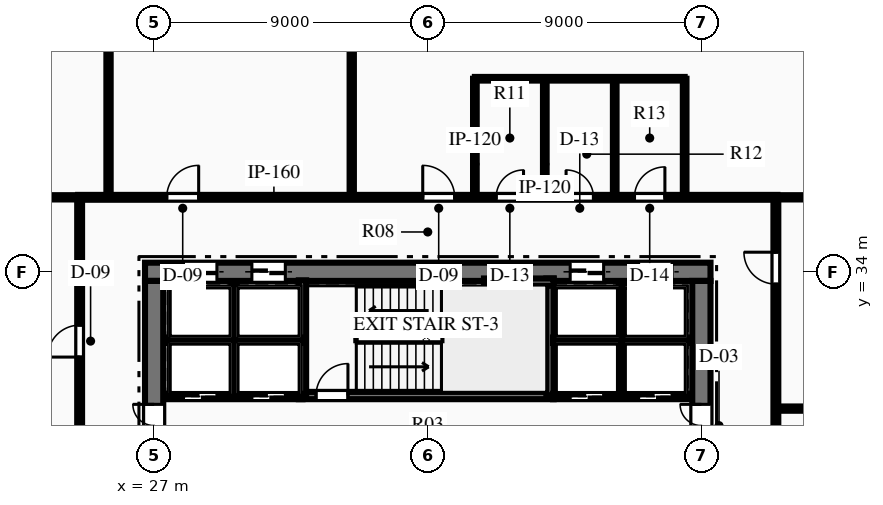
"""IFC4 building model, lengths in metres.
Left out: names, types, materials, properties, quantities, classifications, styles, units other than length and angle.
Written with IfcOpenShell. Run it as: python <this file> out.ifc"""

import sys

from ifc_helpers import new_model, si_unit, direction, frame, frame_2d, origin, place, context, subcontext, project, spatial, rectangle, extrude, element, fill, save


model = new_model("IFC4")
c1 = context("Model", 3, precision=1e-05, world=origin(), true_north=direction((0.0, 1.0)))
c2 = subcontext(c1, "Body", "Model", "MODEL_VIEW")
j1 = project(units=[si_unit("LENGTHUNIT", "METRE"), si_unit("PLANEANGLEUNIT", "RADIAN")], contexts=[c1])
p1 = place(None, origin())
s1 = spatial("IfcSite", under=j1, at=p1, CompositionType="ELEMENT")
p2 = place(p1, origin())
s2 = spatial("IfcBuilding", under=s1, at=p2, CompositionType="ELEMENT")
p3 = place(p2, frame((0.0, 0.0, 32.7)))
s3 = spatial("IfcBuildingStorey", under=s2, at=p3, CompositionType="ELEMENT", Elevation=32.7)
p4 = place(p3, frame((26.7, 34.0, 0.0), z_axis=(0.0, 0.0, 1.0), x_axis=(1.0, 0.0, 0.0)))
e1 = element("IfcWall", 1, at=p4, inside=s3, PredefinedType="SHEAR", context=c2, shape_type="SweptSolid", body=[
    extrude(rectangle(XDim=18.6, YDim=0.6, at=frame_2d((9.3, 0.0))), origin(), (0.0, 0.0, 1.0), 3.75),
])
p5 = place(p4, frame((1.265, 0.0, 0.0)))
e2 = element("IfcOpeningElement", 2, at=p5, cuts=e1, PredefinedType="OPENING", context=c2, shape_type="SweptSolid", body=[
    extrude(rectangle(XDim=1.1, YDim=2.15, at=frame_2d((0.55, 1.075))), frame((0.0, 0.31, 0.0), z_axis=(0.0, -1.0, 0.0), x_axis=(1.0, 0.0, 0.0)), (0.0, 0.0, 1.0), 0.62),
])
p6 = place(p4, frame((3.515, 0.0, 0.0)))
e3 = element("IfcOpeningElement", 3, at=p6, cuts=e1, PredefinedType="OPENING", context=c2, shape_type="SweptSolid", body=[
    extrude(rectangle(XDim=1.1, YDim=2.15, at=frame_2d((0.55, 1.075))), frame((0.0, 0.31, 0.0), z_axis=(0.0, -1.0, 0.0), x_axis=(1.0, 0.0, 0.0)), (0.0, 0.0, 1.0), 0.62),
])
p7 = place(p4, frame((13.985, 0.0, 0.0)))
e4 = element("IfcOpeningElement", 4, at=p7, cuts=e1, PredefinedType="OPENING", context=c2, shape_type="SweptSolid", body=[
    extrude(rectangle(XDim=1.1, YDim=2.15, at=frame_2d((0.55, 1.075))), frame((0.0, 0.31, 0.0), z_axis=(0.0, -1.0, 0.0), x_axis=(1.0, 0.0, 0.0)), (0.0, 0.0, 1.0), 0.62),
])
p8 = place(p4, frame((16.235, 0.0, 0.0)))
e5 = element("IfcOpeningElement", 5, at=p8, cuts=e1, PredefinedType="OPENING", context=c2, shape_type="SweptSolid", body=[
    extrude(rectangle(XDim=1.1, YDim=2.15, at=frame_2d((0.55, 1.075))), frame((0.0, 0.31, 0.0), z_axis=(0.0, -1.0, 0.0), x_axis=(1.0, 0.0, 0.0)), (0.0, 0.0, 1.0), 0.62),
])
p9 = place(p3, frame((27.0, 18.3, 0.0), z_axis=(0.0, 0.0, 1.0), x_axis=(0.0, 1.0, 0.0)))
e6 = element("IfcWall", 6, at=p9, inside=s3, PredefinedType="SHEAR", context=c2, shape_type="SweptSolid", body=[
    extrude(rectangle(XDim=15.4, YDim=0.6, at=frame_2d((7.7, 0.0))), origin(), (0.0, 0.0, 1.0), 3.75),
])
p10 = place(p9, frame((9.94, 0.0, 0.0)))
e7 = element("IfcOpeningElement", 7, at=p10, cuts=e6, PredefinedType="OPENING", context=c2, shape_type="SweptSolid", body=[
    extrude(rectangle(XDim=1.4, YDim=2.2, at=frame_2d((0.7, 1.1))), frame((0.0, 0.31, 0.0), z_axis=(0.0, -1.0, 0.0), x_axis=(1.0, 0.0, 0.0)), (0.0, 0.0, 1.0), 0.62),
])
p11 = place(p3, frame((45.0, 18.3, 0.0), z_axis=(0.0, 0.0, 1.0), x_axis=(0.0, 1.0, 0.0)))
e8 = element("IfcWall", 8, at=p11, inside=s3, PredefinedType="SHEAR", context=c2, shape_type="SweptSolid", body=[
    extrude(rectangle(XDim=15.4, YDim=0.6, at=frame_2d((7.7, 0.0))), origin(), (0.0, 0.0, 1.0), 3.75),
])
p12 = place(p11, frame((9.94, 0.0, 0.0)))
e9 = element("IfcOpeningElement", 9, at=p12, cuts=e8, PredefinedType="OPENING", context=c2, shape_type="SweptSolid", body=[
    extrude(rectangle(XDim=1.4, YDim=2.2, at=frame_2d((0.7, 1.1))), frame((0.0, 0.31, 0.0), z_axis=(0.0, -1.0, 0.0), x_axis=(1.0, 0.0, 0.0)), (0.0, 0.0, 1.0), 0.62),
])
p13 = place(p3, frame((31.76, 29.93, 0.0), z_axis=(0.0, 0.0, 1.0), x_axis=(1.0, 0.0, 0.0)))
e10 = element("IfcWall", 10, at=p13, inside=s3, PredefinedType="SHEAR", context=c2, shape_type="SweptSolid", body=[
    extrude(rectangle(XDim=8.38, YDim=0.24, at=frame_2d((4.19, 0.0))), origin(), (0.0, 0.0, 1.0), 3.75),
])
p14 = place(p13, frame((0.565, 0.0, 0.0)))
e11 = element("IfcOpeningElement", 11, at=p14, cuts=e10, PredefinedType="OPENING", context=c2, shape_type="SweptSolid", body=[
    extrude(rectangle(XDim=1.05, YDim=2.15, at=frame_2d((0.525, 1.075))), frame((0.0, 0.13, 0.0), z_axis=(0.0, -1.0, 0.0), x_axis=(1.0, 0.0, 0.0)), (0.0, 0.0, 1.0), 0.26),
])
p15 = place(p3, frame((31.88, 29.93, 0.0), z_axis=(0.0, 0.0, 1.0), x_axis=(0.0, 1.0, 0.0)))
e12 = element("IfcWall", 12, at=p15, inside=s3, PredefinedType="SHEAR", context=c2, shape_type="SweptSolid", body=[
    extrude(rectangle(XDim=3.79, YDim=0.24, at=frame_2d((1.895, 0.0))), origin(), (0.0, 0.0, 1.0), 3.75),
])
p16 = place(p3, frame((40.02, 29.93, 0.0), z_axis=(0.0, 0.0, 1.0), x_axis=(0.0, 1.0, 0.0)))
e13 = element("IfcWall", 13, at=p16, inside=s3, PredefinedType="SHEAR", context=c2, shape_type="SweptSolid", body=[
    extrude(rectangle(XDim=3.85, YDim=0.24, at=frame_2d((1.925, 0.0))), origin(), (0.0, 0.0, 1.0), 3.75),
])
p17 = place(p3, frame((37.85, 33.66, 0.0), z_axis=(0.0, 0.0, 1.0), x_axis=(1.0, 0.0, 0.0)))
e14 = element("IfcWall", 14, at=p17, inside=s3, PredefinedType="SHEAR", context=c2, shape_type="SweptSolid", body=[
    extrude(rectangle(XDim=2.29, YDim=0.24, at=frame_2d((1.145, 0.0))), origin(), (0.0, 0.0, 1.0), 3.75),
])
p18 = place(p3, frame((27.45, 29.9, 0.0), z_axis=(0.0, 0.0, 1.0), x_axis=(1.0, 0.0, 0.0)))
e15 = element("IfcWall", 15, at=p18, inside=s3, PredefinedType="PARTITIONING", context=c2, shape_type="SweptSolid", body=[
    extrude(rectangle(XDim=4.43, YDim=0.18, at=frame_2d((2.215, 0.0))), origin(), (0.0, 0.0, 1.0), 3.44),
])
p19 = place(p18, frame((0.515, 0.0, 0.0)))
e16 = element("IfcOpeningElement", 16, at=p19, cuts=e15, PredefinedType="OPENING", context=c2, shape_type="SweptSolid", body=[
    extrude(rectangle(XDim=1.1, YDim=2.15, at=frame_2d((0.55, 1.075))), frame((0.0, 0.1, 0.0), z_axis=(0.0, -1.0, 0.0), x_axis=(1.0, 0.0, 0.0)), (0.0, 0.0, 1.0), 0.2),
])
p20 = place(p18, frame((2.765, 0.0, 0.0)))
e17 = element("IfcOpeningElement", 17, at=p20, cuts=e15, PredefinedType="OPENING", context=c2, shape_type="SweptSolid", body=[
    extrude(rectangle(XDim=1.1, YDim=2.15, at=frame_2d((0.55, 1.075))), frame((0.0, 0.1, 0.0), z_axis=(0.0, -1.0, 0.0), x_axis=(1.0, 0.0, 0.0)), (0.0, 0.0, 1.0), 0.2),
])
p21 = place(p3, frame((27.45, 31.75, 0.0), z_axis=(0.0, 0.0, 1.0), x_axis=(1.0, 0.0, 0.0)))
e18 = element("IfcWall", 18, at=p21, inside=s3, PredefinedType="PARTITIONING", context=c2, shape_type="SweptSolid", body=[
    extrude(rectangle(XDim=4.43, YDim=0.18, at=frame_2d((2.215, 0.0))), origin(), (0.0, 0.0, 1.0), 3.44),
])
p22 = place(p3, frame((29.63, 29.9, 0.0), z_axis=(0.0, 0.0, 1.0), x_axis=(0.0, 1.0, 0.0)))
e19 = element("IfcWall", 19, at=p22, inside=s3, PredefinedType="PARTITIONING", context=c2, shape_type="SweptSolid", body=[
    extrude(rectangle(XDim=3.75, YDim=0.18, at=frame_2d((1.875, 0.0))), origin(), (0.0, 0.0, 1.0), 3.44),
])
p23 = place(p3, frame((40.12, 29.9, 0.0), z_axis=(0.0, 0.0, 1.0), x_axis=(1.0, 0.0, 0.0)))
e20 = element("IfcWall", 20, at=p23, inside=s3, PredefinedType="PARTITIONING", context=c2, shape_type="SweptSolid", body=[
    extrude(rectangle(XDim=4.43, YDim=0.18, at=frame_2d((2.215, 0.0))), origin(), (0.0, 0.0, 1.0), 3.44),
])
p24 = place(p23, frame((0.565, 0.0, 0.0)))
e21 = element("IfcOpeningElement", 21, at=p24, cuts=e20, PredefinedType="OPENING", context=c2, shape_type="SweptSolid", body=[
    extrude(rectangle(XDim=1.1, YDim=2.15, at=frame_2d((0.55, 1.075))), frame((0.0, 0.1, 0.0), z_axis=(0.0, -1.0, 0.0), x_axis=(1.0, 0.0, 0.0)), (0.0, 0.0, 1.0), 0.2),
])
p25 = place(p23, frame((2.815, 0.0, 0.0)))
e22 = element("IfcOpeningElement", 22, at=p25, cuts=e20, PredefinedType="OPENING", context=c2, shape_type="SweptSolid", body=[
    extrude(rectangle(XDim=1.1, YDim=2.15, at=frame_2d((0.55, 1.075))), frame((0.0, 0.1, 0.0), z_axis=(0.0, -1.0, 0.0), x_axis=(1.0, 0.0, 0.0)), (0.0, 0.0, 1.0), 0.2),
])
p26 = place(p3, frame((40.12, 31.75, 0.0), z_axis=(0.0, 0.0, 1.0), x_axis=(1.0, 0.0, 0.0)))
e23 = element("IfcWall", 23, at=p26, inside=s3, PredefinedType="PARTITIONING", context=c2, shape_type="SweptSolid", body=[
    extrude(rectangle(XDim=4.43, YDim=0.18, at=frame_2d((2.215, 0.0))), origin(), (0.0, 0.0, 1.0), 3.44),
])
p27 = place(p3, frame((42.37, 29.9, 0.0), z_axis=(0.0, 0.0, 1.0), x_axis=(0.0, 1.0, 0.0)))
e24 = element("IfcWall", 24, at=p27, inside=s3, PredefinedType="PARTITIONING", context=c2, shape_type="SweptSolid", body=[
    extrude(rectangle(XDim=3.75, YDim=0.18, at=frame_2d((1.875, 0.0))), origin(), (0.0, 0.0, 1.0), 3.44),
])
p28 = place(p3, frame((24.5, 36.45, 0.0), z_axis=(0.0, 0.0, 1.0), x_axis=(1.0, 0.0, 0.0)))
e25 = element("IfcWall", 25, at=p28, inside=s3, PredefinedType="PARTITIONING", context=c2, shape_type="SweptSolid", body=[
    extrude(rectangle(XDim=23.0, YDim=0.16, at=frame_2d((11.5, 0.0))), origin(), (0.0, 0.0, 1.0), 3.44),
])
p29 = place(p28, frame((13.75, 0.0, 0.0)))
e26 = element("IfcOpeningElement", 26, at=p29, cuts=e25, PredefinedType="OPENING", context=c2, shape_type="SweptSolid", body=[
    extrude(rectangle(XDim=0.9, YDim=2.15, at=frame_2d((0.45, 1.075))), frame((0.0, 0.09, 0.0), z_axis=(0.0, -1.0, 0.0), x_axis=(1.0, 0.0, 0.0)), (0.0, 0.0, 1.0), 0.18),
])
p30 = place(p28, frame((16.05, 0.0, 0.0)))
e27 = element("IfcOpeningElement", 27, at=p30, cuts=e25, PredefinedType="OPENING", context=c2, shape_type="SweptSolid", body=[
    extrude(rectangle(XDim=0.9, YDim=2.15, at=frame_2d((0.45, 1.075))), frame((0.0, 0.09, 0.0), z_axis=(0.0, -1.0, 0.0), x_axis=(1.0, 0.0, 0.0)), (0.0, 0.0, 1.0), 0.18),
])
p31 = place(p28, frame((18.3, 0.0, 0.0)))
e28 = element("IfcOpeningElement", 28, at=p31, cuts=e25, PredefinedType="OPENING", context=c2, shape_type="SweptSolid", body=[
    extrude(rectangle(XDim=1.0, YDim=2.15, at=frame_2d((0.5, 1.075))), frame((0.0, 0.09, 0.0), z_axis=(0.0, -1.0, 0.0), x_axis=(1.0, 0.0, 0.0)), (0.0, 0.0, 1.0), 0.18),
])
p32 = place(p28, frame((2.915, 0.0, 0.0)))
e29 = element("IfcOpeningElement", 29, at=p32, cuts=e25, PredefinedType="OPENING", context=c2, shape_type="SweptSolid", body=[
    extrude(rectangle(XDim=1.05, YDim=2.15, at=frame_2d((0.525, 1.075))), frame((0.0, 0.09, 0.0), z_axis=(0.0, -1.0, 0.0), x_axis=(1.0, 0.0, 0.0)), (0.0, 0.0, 1.0), 0.18),
])
p33 = place(p28, frame((11.335, 0.0, 0.0)))
e30 = element("IfcOpeningElement", 30, at=p33, cuts=e25, PredefinedType="OPENING", context=c2, shape_type="SweptSolid", body=[
    extrude(rectangle(XDim=1.05, YDim=2.15, at=frame_2d((0.525, 1.075))), frame((0.0, 0.09, 0.0), z_axis=(0.0, -1.0, 0.0), x_axis=(1.0, 0.0, 0.0)), (0.0, 0.0, 1.0), 0.18),
])
p34 = place(p3, frame((24.55, 15.55, 0.0), z_axis=(0.0, 0.0, 1.0), x_axis=(0.0, 1.0, 0.0)))
e31 = element("IfcWall", 31, at=p34, inside=s3, PredefinedType="PARTITIONING", context=c2, shape_type="SweptSolid", body=[
    extrude(rectangle(XDim=20.9, YDim=0.16, at=frame_2d((10.45, 0.0))), origin(), (0.0, 0.0, 1.0), 3.44),
])
p35 = place(p34, frame((2.052, 0.0, 0.0)))
e32 = element("IfcOpeningElement", 32, at=p35, cuts=e31, PredefinedType="OPENING", context=c2, shape_type="SweptSolid", body=[
    extrude(rectangle(XDim=1.05, YDim=2.15, at=frame_2d((0.525, 1.075))), frame((0.0, 0.09, 0.0), z_axis=(0.0, -1.0, 0.0), x_axis=(1.0, 0.0, 0.0)), (0.0, 0.0, 1.0), 0.18),
])
p36 = place(p34, frame((15.645, 0.0, 0.0)))
e33 = element("IfcOpeningElement", 33, at=p36, cuts=e31, PredefinedType="OPENING", context=c2, shape_type="SweptSolid", body=[
    extrude(rectangle(XDim=1.05, YDim=2.15, at=frame_2d((0.525, 1.075))), frame((0.0, 0.09, 0.0), z_axis=(0.0, -1.0, 0.0), x_axis=(1.0, 0.0, 0.0)), (0.0, 0.0, 1.0), 0.18),
])
p37 = place(p3, frame((47.45, 15.55, 0.0), z_axis=(0.0, 0.0, 1.0), x_axis=(0.0, 1.0, 0.0)))
e34 = element("IfcWall", 34, at=p37, inside=s3, PredefinedType="PARTITIONING", context=c2, shape_type="SweptSolid", body=[
    extrude(rectangle(XDim=20.9, YDim=0.16, at=frame_2d((10.45, 0.0))), origin(), (0.0, 0.0, 1.0), 3.44),
])
p38 = place(p37, frame((3.747, 0.0, 0.0)))
e35 = element("IfcOpeningElement", 35, at=p38, cuts=e34, PredefinedType="OPENING", context=c2, shape_type="SweptSolid", body=[
    extrude(rectangle(XDim=1.05, YDim=2.15, at=frame_2d((0.525, 1.075))), frame((0.0, 0.09, 0.0), z_axis=(0.0, -1.0, 0.0), x_axis=(1.0, 0.0, 0.0)), (0.0, 0.0, 1.0), 0.18),
])
p39 = place(p37, frame((7.865, 0.0, 0.0)))
e36 = element("IfcOpeningElement", 36, at=p39, cuts=e34, PredefinedType="OPENING", context=c2, shape_type="SweptSolid", body=[
    extrude(rectangle(XDim=1.05, YDim=2.15, at=frame_2d((0.525, 1.075))), frame((0.0, 0.09, 0.0), z_axis=(0.0, -1.0, 0.0), x_axis=(1.0, 0.0, 0.0)), (0.0, 0.0, 1.0), 0.18),
])
p40 = place(p37, frame((18.045, 0.0, 0.0)))
e37 = element("IfcOpeningElement", 37, at=p40, cuts=e34, PredefinedType="OPENING", context=c2, shape_type="SweptSolid", body=[
    extrude(rectangle(XDim=1.05, YDim=2.15, at=frame_2d((0.525, 1.075))), frame((0.0, 0.09, 0.0), z_axis=(0.0, -1.0, 0.0), x_axis=(1.0, 0.0, 0.0)), (0.0, 0.0, 1.0), 0.18),
])
for number, where, z_axis, x_axis in (
    (38, (37.55, 36.45, 0.0), (0.0, 0.0, 1.0), (0.0, 1.0, 0.0)),
    (39, (39.85, 36.45, 0.0), (0.0, 0.0, 1.0), (0.0, 1.0, 0.0)),
    (40, (42.15, 36.45, 0.0), (0.0, 0.0, 1.0), (0.0, 1.0, 0.0)),
    (41, (44.45, 36.45, 0.0), (0.0, 0.0, 1.0), (0.0, 1.0, 0.0)),
):
    element("IfcWall", number, at=place(p3, frame(where, z_axis=z_axis, x_axis=x_axis)), inside=s3, PredefinedType="PARTITIONING", context=c2, shape_type="SweptSolid", body=[
        extrude(rectangle(XDim=3.9, YDim=0.12, at=frame_2d((1.95, 0.0))), origin(), (0.0, 0.0, 1.0), 3.44),
    ])
p41 = place(p3, frame((37.55, 40.35, 0.0), z_axis=(0.0, 0.0, 1.0), x_axis=(1.0, 0.0, 0.0)))
e42 = element("IfcWall", 42, at=p41, inside=s3, PredefinedType="PARTITIONING", context=c2, shape_type="SweptSolid", body=[
    extrude(rectangle(XDim=6.9, YDim=0.12, at=frame_2d((3.45, 0.0))), origin(), (0.0, 0.0, 1.0), 3.44),
])
p42 = place(p3, frame((8.825, 36.45, 0.0), z_axis=(0.0, 0.0, 1.0), x_axis=(1.0, 0.0, 0.0)))
e43 = element("IfcWall", 43, at=p42, inside=s3, PredefinedType="PARTITIONING", context=c2, shape_type="SweptSolid", body=[
    extrude(rectangle(XDim=15.725, YDim=0.14, at=frame_2d((7.863, 0.0))), origin(), (0.0, 0.0, 1.0), 2.739),
])
p43 = place(p42, frame((10.656, 0.0, 0.0)))
e44 = element("IfcOpeningElement", 44, at=p43, cuts=e43, PredefinedType="OPENING", context=c2, shape_type="SweptSolid", body=[
    extrude(rectangle(XDim=0.95, YDim=2.15, at=frame_2d((0.475, 1.075))), frame((0.0, 0.08, 0.0), z_axis=(0.0, -1.0, 0.0), x_axis=(1.0, 0.0, 0.0)), (0.0, 0.0, 1.0), 0.16),
])
p44 = place(p3, frame((47.45, 36.45, 0.0), z_axis=(0.0, 0.0, 1.0), x_axis=(1.0, 0.0, 0.0)))
e45 = element("IfcWall", 45, at=p44, inside=s3, PredefinedType="PARTITIONING", context=c2, shape_type="SweptSolid", body=[
    extrude(rectangle(XDim=15.306, YDim=0.14, at=frame_2d((7.653, 0.0))), origin(), (0.0, 0.0, 1.0), 3.44),
])
p45 = place(p3, frame((25.5, 36.45, 0.0), z_axis=(0.0, 0.0, 1.0), x_axis=(0.0, 1.0, 0.0)))
e46 = element("IfcWall", 46, at=p45, inside=s3, PredefinedType="PARTITIONING", context=c2, shape_type="SweptSolid", body=[
    extrude(rectangle(XDim=15.304, YDim=0.14, at=frame_2d((7.652, 0.0))), origin(), (0.0, 0.0, 1.0), 3.44),
])
p46 = place(p3, frame((33.5, 36.45, 0.0), z_axis=(0.0, 0.0, 1.0), x_axis=(0.0, 1.0, 0.0)))
e47 = element("IfcWall", 47, at=p46, inside=s3, PredefinedType="PARTITIONING", context=c2, shape_type="SweptSolid", body=[
    extrude(rectangle(XDim=15.465, YDim=0.14, at=frame_2d((7.732, 0.0))), origin(), (0.0, 0.0, 1.0), 3.44),
])
p47 = place(p3, frame((47.45, 29.5, 0.0), z_axis=(0.0, 0.0, 1.0), x_axis=(1.0, 0.0, 0.0)))
e48 = element("IfcWall", 48, at=p47, inside=s3, PredefinedType="PARTITIONING", context=c2, shape_type="SweptSolid", body=[
    extrude(rectangle(XDim=15.445, YDim=0.14, at=frame_2d((7.723, 0.0))), origin(), (0.0, 0.0, 1.0), 2.739),
])
p48 = place(p14, origin())
e49 = element("IfcDoor", 49, at=p48, inside=s3, OperationType="SINGLE_SWING_RIGHT", PredefinedType="DOOR", context=c2, shape_type="SweptSolid", body=[
    extrude(rectangle(XDim=1.05, YDim=2.15, at=frame_2d((0.525, 1.075))), frame((0.0, 0.025, 0.0), z_axis=(0.0, -1.0, 0.0), x_axis=(1.0, 0.0, 0.0)), (0.0, 0.0, 1.0), 0.05),
])
fill(e11, e49)
p49 = place(p10, origin())
e50 = element("IfcDoor", 50, at=p49, inside=s3, OperationType="DOUBLE_DOOR_SINGLE_SWING", PredefinedType="DOOR", context=c2, shape_type="SweptSolid", body=[
    extrude(rectangle(XDim=1.4, YDim=2.2, at=frame_2d((0.7, 1.1))), frame((0.0, 0.025, 0.0), z_axis=(0.0, -1.0, 0.0), x_axis=(1.0, 0.0, 0.0)), (0.0, 0.0, 1.0), 0.05),
])
fill(e7, e50)
p50 = place(p12, origin())
e51 = element("IfcDoor", 51, at=p50, inside=s3, OperationType="DOUBLE_DOOR_SINGLE_SWING", PredefinedType="DOOR", context=c2, shape_type="SweptSolid", body=[
    extrude(rectangle(XDim=1.4, YDim=2.2, at=frame_2d((0.7, 1.1))), frame((0.0, 0.025, 0.0), z_axis=(0.0, -1.0, 0.0), x_axis=(1.0, 0.0, 0.0)), (0.0, 0.0, 1.0), 0.05),
])
fill(e9, e51)
p51 = place(p29, origin())
e52 = element("IfcDoor", 52, at=p51, inside=s3, OperationType="SINGLE_SWING_RIGHT", PredefinedType="DOOR", context=c2, shape_type="SweptSolid", body=[
    extrude(rectangle(XDim=0.9, YDim=2.15, at=frame_2d((0.45, 1.075))), frame((0.0, 0.025, 0.0), z_axis=(0.0, -1.0, 0.0), x_axis=(1.0, 0.0, 0.0)), (0.0, 0.0, 1.0), 0.05),
])
fill(e26, e52)
p52 = place(p30, origin())
e53 = element("IfcDoor", 53, at=p52, inside=s3, OperationType="SINGLE_SWING_LEFT", PredefinedType="DOOR", context=c2, shape_type="SweptSolid", body=[
    extrude(rectangle(XDim=0.9, YDim=2.15, at=frame_2d((0.45, 1.075))), frame((0.0, 0.025, 0.0), z_axis=(0.0, -1.0, 0.0), x_axis=(1.0, 0.0, 0.0)), (0.0, 0.0, 1.0), 0.05),
])
fill(e27, e53)
p53 = place(p31, origin())
e54 = element("IfcDoor", 54, at=p53, inside=s3, OperationType="SINGLE_SWING_RIGHT", PredefinedType="DOOR", context=c2, shape_type="SweptSolid", body=[
    extrude(rectangle(XDim=1.0, YDim=2.15, at=frame_2d((0.5, 1.075))), frame((0.0, 0.025, 0.0), z_axis=(0.0, -1.0, 0.0), x_axis=(1.0, 0.0, 0.0)), (0.0, 0.0, 1.0), 0.05),
])
fill(e28, e54)
p54 = place(p32, origin())
e55 = element("IfcDoor", 55, at=p54, inside=s3, OperationType="SINGLE_SWING_RIGHT", PredefinedType="DOOR", context=c2, shape_type="SweptSolid", body=[
    extrude(rectangle(XDim=1.05, YDim=2.15, at=frame_2d((0.525, 1.075))), frame((0.0, 0.025, 0.0), z_axis=(0.0, -1.0, 0.0), x_axis=(1.0, 0.0, 0.0)), (0.0, 0.0, 1.0), 0.05),
])
fill(e29, e55)
p55 = place(p33, origin())
e56 = element("IfcDoor", 56, at=p55, inside=s3, OperationType="SINGLE_SWING_LEFT", PredefinedType="DOOR", context=c2, shape_type="SweptSolid", body=[
    extrude(rectangle(XDim=1.05, YDim=2.15, at=frame_2d((0.525, 1.075))), frame((0.0, 0.025, 0.0), z_axis=(0.0, -1.0, 0.0), x_axis=(1.0, 0.0, 0.0)), (0.0, 0.0, 1.0), 0.05),
])
fill(e30, e56)
p56 = place(p36, origin())
e57 = element("IfcDoor", 57, at=p56, inside=s3, OperationType="SINGLE_SWING_LEFT", PredefinedType="DOOR", context=c2, shape_type="SweptSolid", body=[
    extrude(rectangle(XDim=1.05, YDim=2.15, at=frame_2d((0.525, 1.075))), frame((0.0, 0.025, 0.0), z_axis=(0.0, -1.0, 0.0), x_axis=(1.0, 0.0, 0.0)), (0.0, 0.0, 1.0), 0.05),
])
fill(e33, e57)
p57 = place(p40, origin())
e58 = element("IfcDoor", 58, at=p57, inside=s3, OperationType="SINGLE_SWING_RIGHT", PredefinedType="DOOR", context=c2, shape_type="SweptSolid", body=[
    extrude(rectangle(XDim=1.05, YDim=2.15, at=frame_2d((0.525, 1.075))), frame((0.0, 0.025, 0.0), z_axis=(0.0, -1.0, 0.0), x_axis=(1.0, 0.0, 0.0)), (0.0, 0.0, 1.0), 0.05),
])
fill(e37, e58)
p58 = place(p19, origin())
e59 = element("IfcDoor", 59, at=p58, inside=s3, OperationType="SLIDING_TO_LEFT", PredefinedType="DOOR", context=c2, shape_type="SweptSolid", body=[
    extrude(rectangle(XDim=1.1, YDim=2.15, at=frame_2d((0.55, 1.075))), frame((0.0, 0.025, 0.0), z_axis=(0.0, -1.0, 0.0), x_axis=(1.0, 0.0, 0.0)), (0.0, 0.0, 1.0), 0.05),
])
fill(e16, e59)
p59 = place(p20, origin())
e60 = element("IfcDoor", 60, at=p59, inside=s3, OperationType="SLIDING_TO_LEFT", PredefinedType="DOOR", context=c2, shape_type="SweptSolid", body=[
    extrude(rectangle(XDim=1.1, YDim=2.15, at=frame_2d((0.55, 1.075))), frame((0.0, 0.025, 0.0), z_axis=(0.0, -1.0, 0.0), x_axis=(1.0, 0.0, 0.0)), (0.0, 0.0, 1.0), 0.05),
])
fill(e17, e60)
p60 = place(p5, origin())
e61 = element("IfcDoor", 61, at=p60, inside=s3, OperationType="SLIDING_TO_LEFT", PredefinedType="DOOR", context=c2, shape_type="SweptSolid", body=[
    extrude(rectangle(XDim=1.1, YDim=2.15, at=frame_2d((0.55, 1.075))), frame((0.0, 0.025, 0.0), z_axis=(0.0, -1.0, 0.0), x_axis=(1.0, 0.0, 0.0)), (0.0, 0.0, 1.0), 0.05),
])
fill(e2, e61)
p61 = place(p6, origin())
e62 = element("IfcDoor", 62, at=p61, inside=s3, OperationType="SLIDING_TO_LEFT", PredefinedType="DOOR", context=c2, shape_type="SweptSolid", body=[
    extrude(rectangle(XDim=1.1, YDim=2.15, at=frame_2d((0.55, 1.075))), frame((0.0, 0.025, 0.0), z_axis=(0.0, -1.0, 0.0), x_axis=(1.0, 0.0, 0.0)), (0.0, 0.0, 1.0), 0.05),
])
fill(e3, e62)
p62 = place(p24, origin())
e63 = element("IfcDoor", 63, at=p62, inside=s3, OperationType="SLIDING_TO_LEFT", PredefinedType="DOOR", context=c2, shape_type="SweptSolid", body=[
    extrude(rectangle(XDim=1.1, YDim=2.15, at=frame_2d((0.55, 1.075))), frame((0.0, 0.025, 0.0), z_axis=(0.0, -1.0, 0.0), x_axis=(1.0, 0.0, 0.0)), (0.0, 0.0, 1.0), 0.05),
])
fill(e21, e63)
p63 = place(p25, origin())
e64 = element("IfcDoor", 64, at=p63, inside=s3, OperationType="SLIDING_TO_LEFT", PredefinedType="DOOR", context=c2, shape_type="SweptSolid", body=[
    extrude(rectangle(XDim=1.1, YDim=2.15, at=frame_2d((0.55, 1.075))), frame((0.0, 0.025, 0.0), z_axis=(0.0, -1.0, 0.0), x_axis=(1.0, 0.0, 0.0)), (0.0, 0.0, 1.0), 0.05),
])
fill(e22, e64)
p64 = place(p7, origin())
e65 = element("IfcDoor", 65, at=p64, inside=s3, OperationType="SLIDING_TO_LEFT", PredefinedType="DOOR", context=c2, shape_type="SweptSolid", body=[
    extrude(rectangle(XDim=1.1, YDim=2.15, at=frame_2d((0.55, 1.075))), frame((0.0, 0.025, 0.0), z_axis=(0.0, -1.0, 0.0), x_axis=(1.0, 0.0, 0.0)), (0.0, 0.0, 1.0), 0.05),
])
fill(e4, e65)
p65 = place(p8, origin())
e66 = element("IfcDoor", 66, at=p65, inside=s3, OperationType="SLIDING_TO_LEFT", PredefinedType="DOOR", context=c2, shape_type="SweptSolid", body=[
    extrude(rectangle(XDim=1.1, YDim=2.15, at=frame_2d((0.55, 1.075))), frame((0.0, 0.025, 0.0), z_axis=(0.0, -1.0, 0.0), x_axis=(1.0, 0.0, 0.0)), (0.0, 0.0, 1.0), 0.05),
])
fill(e5, e66)
save(model, sys.argv[1])
